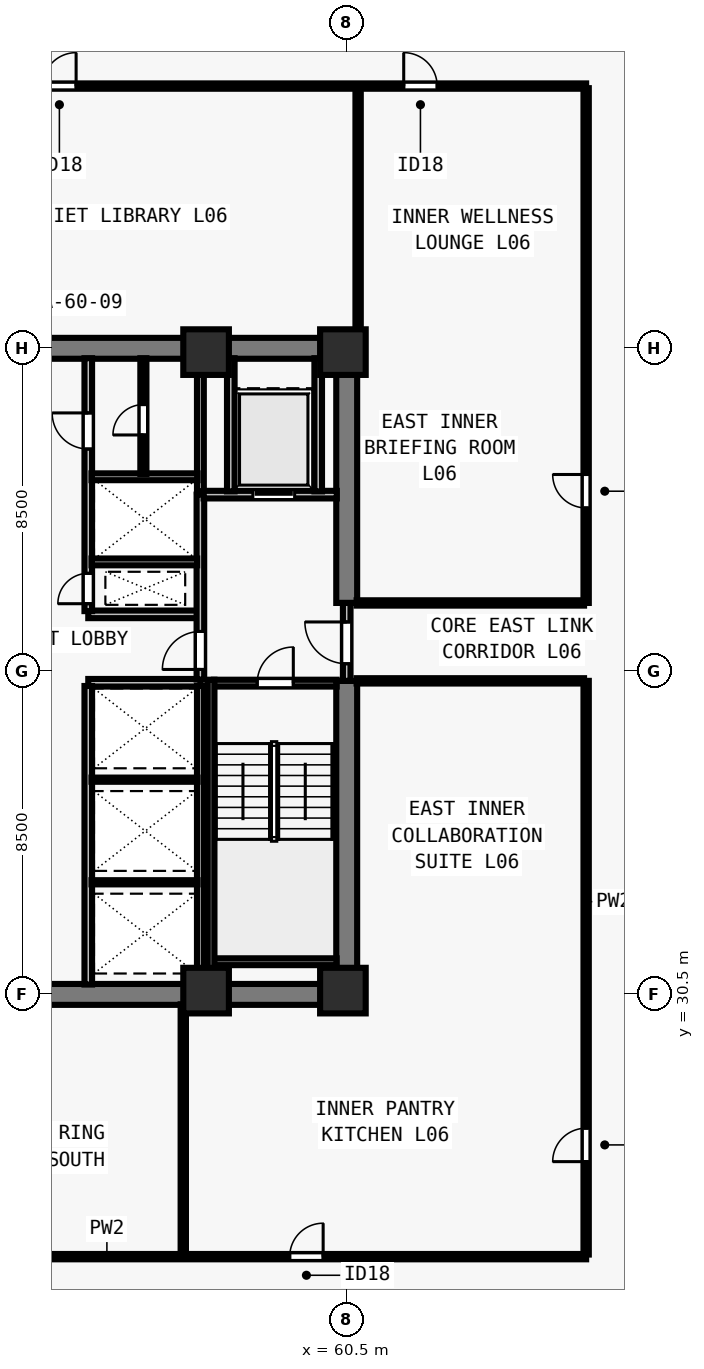
"""IFC4 building model, lengths in metres.
Left out: names, types, materials, properties, quantities, classifications, styles, units other than length and angle.
Written with IfcOpenShell. Run it as: python <this file> out.ifc"""

import sys

from ifc_helpers import new_model, si_unit, direction, frame, frame_2d, origin, origin_2d, place, context, subcontext, project, spatial, rectangle, extrude, element, fill, save


model = new_model("IFC4")
c1 = context("Model", 3, precision=1e-05, world=origin(), true_north=direction((0.0, 1.0)))
c2 = subcontext(c1, "Body", "Model", "MODEL_VIEW")
j1 = project(units=[si_unit("LENGTHUNIT", "METRE"), si_unit("PLANEANGLEUNIT", "RADIAN")], contexts=[c1])
p1 = place(None, origin())
s1 = spatial("IfcSite", under=j1, at=p1, CompositionType="ELEMENT")
p2 = place(p1, origin())
s2 = spatial("IfcBuilding", under=s1, at=p2, CompositionType="ELEMENT")
p3 = place(p2, frame((0.0, 0.0, 27.0)))
s3 = spatial("IfcBuildingStorey", under=s2, at=p3, CompositionType="ELEMENT", Elevation=27.0)
for number, where, z_axis, x_axis in (
    (1, (56.8, 30.6, 0.0), (0.0, 0.0, 1.0), (1.0, 0.0, 0.0)),
    (2, (60.4, 30.6, 0.0), (0.0, 0.0, 1.0), (1.0, 0.0, 0.0)),
    (3, (56.8, 47.4, 0.0), (0.0, 0.0, 1.0), (1.0, 0.0, 0.0)),
    (4, (60.4, 47.4, 0.0), (0.0, 0.0, 1.0), (1.0, 0.0, 0.0)),
):
    element("IfcColumn", number, at=place(p3, frame(where, z_axis=z_axis, x_axis=x_axis)), inside=s3, PredefinedType="COLUMN", context=c2, shape_type="SweptSolid", body=[
        extrude(rectangle(XDim=1.2, YDim=1.2, at=origin_2d()), origin(), (0.0, 0.0, 1.0), 3.5),
    ])
for number, where, z_axis, x_axis in (
    (5, (43.225, 30.5, 0.0), (0.0, 0.0, 1.0), (1.0, 0.0, 0.0)),
    (6, (43.225, 47.5, 0.0), (0.0, 0.0, 1.0), (1.0, 0.0, 0.0)),
):
    element("IfcWall", number, at=place(p3, frame(where, z_axis=z_axis, x_axis=x_axis)), inside=s3, PredefinedType="SHEAR", context=c2, shape_type="SweptSolid", body=[
        extrude(rectangle(XDim=17.55, YDim=0.55, at=frame_2d((8.775, 0.0))), origin(), (0.0, 0.0, 1.0), 3.28),
    ])
p4 = place(p3, frame((60.5, 30.765, 0.0), z_axis=(0.0, 0.0, 1.0), x_axis=(0.0, 1.0, 0.0)))
e7 = element("IfcWall", 7, at=p4, inside=s3, PredefinedType="SHEAR", context=c2, shape_type="SweptSolid", body=[
    extrude(rectangle(XDim=7.985, YDim=0.55, at=frame_2d((3.993, 0.0))), origin(), (0.0, 0.0, 1.0), 3.28),
])
p5 = place(p3, frame((60.5, 40.8, 0.0), z_axis=(0.0, 0.0, 1.0), x_axis=(0.0, 1.0, 0.0)))
e8 = element("IfcWall", 8, at=p5, inside=s3, PredefinedType="SHEAR", context=c2, shape_type="SweptSolid", body=[
    extrude(rectangle(XDim=6.435, YDim=0.55, at=frame_2d((3.218, 0.0))), origin(), (0.0, 0.0, 1.0), 3.28),
])
for number, where, z_axis, x_axis in (
    (9, (53.7, 38.7, 0.0), (0.0, 0.0, 1.0), (1.0, 0.0, 0.0)),
    (10, (53.7, 40.5, 0.0), (0.0, 0.0, 1.0), (1.0, 0.0, 0.0)),
):
    element("IfcWall", number, at=place(p3, frame(where, z_axis=z_axis, x_axis=x_axis)), inside=s3, PredefinedType="SOLIDWALL", context=c2, shape_type="SweptSolid", body=[
        extrude(rectangle(XDim=2.95, YDim=0.2, at=frame_2d((1.475, 0.0))), origin(), (0.0, 0.0, 1.0), 3.28),
    ])
p6 = place(p3, frame((53.7, 30.76, 0.0), z_axis=(0.0, 0.0, 1.0), x_axis=(0.0, 1.0, 0.0)))
e11 = element("IfcWall", 11, at=p6, inside=s3, PredefinedType="SOLIDWALL", context=c2, shape_type="SweptSolid", body=[
    extrude(rectangle(XDim=7.855, YDim=0.2, at=frame_2d((3.927, 0.0))), origin(), (0.0, 0.0, 1.0), 3.28),
])
p7 = place(p3, frame((53.7, 40.585, 0.0), z_axis=(0.0, 0.0, 1.0), x_axis=(0.0, 1.0, 0.0)))
e12 = element("IfcWall", 12, at=p7, inside=s3, PredefinedType="SOLIDWALL", context=c2, shape_type="SweptSolid", body=[
    extrude(rectangle(XDim=6.655, YDim=0.2, at=frame_2d((3.328, 0.0))), origin(), (0.0, 0.0, 1.0), 3.28),
])
p8 = place(p7, frame((0.195, 0.0, 0.0)))
e13 = element("IfcOpeningElement", 13, at=p8, cuts=e12, PredefinedType="OPENING", context=c2, shape_type="SweptSolid", body=[
    extrude(rectangle(XDim=0.8, YDim=2.08, at=frame_2d((0.4, 1.04))), frame((0.0, 0.11, 0.0), z_axis=(0.0, -1.0, 0.0), x_axis=(1.0, 0.0, 0.0)), (0.0, 0.0, 1.0), 0.22),
])
p9 = place(p7, frame((4.265, 0.0, 0.0)))
e14 = element("IfcOpeningElement", 14, at=p9, cuts=e12, PredefinedType="OPENING", context=c2, shape_type="SweptSolid", body=[
    extrude(rectangle(XDim=0.95, YDim=2.12, at=frame_2d((0.475, 1.06))), frame((0.0, 0.11, 0.0), z_axis=(0.0, -1.0, 0.0), x_axis=(1.0, 0.0, 0.0)), (0.0, 0.0, 1.0), 0.22),
])
p10 = place(p3, frame((60.5, 38.75, 0.0), z_axis=(0.0, 0.0, 1.0), x_axis=(0.0, 1.0, 0.0)))
e15 = element("IfcWall", 15, at=p10, inside=s3, PredefinedType="SOLIDWALL", context=c2, shape_type="SweptSolid", body=[
    extrude(rectangle(XDim=2.05, YDim=0.2, at=frame_2d((1.025, 0.0))), origin(), (0.0, 0.0, 1.0), 3.28),
])
p11 = place(p10, frame((0.45, 0.0, 0.0)))
e16 = element("IfcOpeningElement", 16, at=p11, cuts=e15, PredefinedType="OPENING", context=c2, shape_type="SweptSolid", body=[
    extrude(rectangle(XDim=1.1, YDim=2.15, at=frame_2d((0.55, 1.075))), frame((0.0, 0.11, 0.0), z_axis=(0.0, -1.0, 0.0), x_axis=(1.0, 0.0, 0.0)), (0.0, 0.0, 1.0), 0.22),
])
p12 = place(p3, frame((56.65, 38.785, 0.0), z_axis=(0.0, 0.0, 1.0), x_axis=(0.0, 1.0, 0.0)))
e17 = element("IfcWall", 17, at=p12, inside=s3, PredefinedType="SOLIDWALL", context=c2, shape_type="SweptSolid", body=[
    extrude(rectangle(XDim=4.865, YDim=0.2, at=frame_2d((2.433, 0.0))), origin(), (0.0, 0.0, 1.0), 3.28),
])
p13 = place(p12, frame((0.265, 0.0, 0.0)))
e18 = element("IfcOpeningElement", 18, at=p13, cuts=e17, PredefinedType="OPENING", context=c2, shape_type="SweptSolid", body=[
    extrude(rectangle(XDim=1.0, YDim=2.15, at=frame_2d((0.5, 1.075))), frame((0.0, 0.11, 0.0), z_axis=(0.0, -1.0, 0.0), x_axis=(1.0, 0.0, 0.0)), (0.0, 0.0, 1.0), 0.22),
])
p14 = place(p3, frame((56.735, 43.65, 0.0), z_axis=(0.0, 0.0, 1.0), x_axis=(1.0, 0.0, 0.0)))
e19 = element("IfcWall", 19, at=p14, inside=s3, PredefinedType="SOLIDWALL", context=c2, shape_type="SweptSolid", body=[
    extrude(rectangle(XDim=3.505, YDim=0.2, at=frame_2d((1.752, 0.0))), origin(), (0.0, 0.0, 1.0), 3.28),
])
p15 = place(p14, frame((1.295, 0.0, 0.0)))
e20 = element("IfcOpeningElement", 20, at=p15, cuts=e19, PredefinedType="OPENING", context=c2, shape_type="SweptSolid", body=[
    extrude(rectangle(XDim=1.1, YDim=2.2, at=frame_2d((0.55, 1.1))), frame((0.0, 0.11, 0.0), z_axis=(0.0, -1.0, 0.0), x_axis=(1.0, 0.0, 0.0)), (0.0, 0.0, 1.0), 0.22),
])
for number, where, z_axis, x_axis in (
    (21, (57.45, 43.735, 0.0), (0.0, 0.0, 1.0), (0.0, 1.0, 0.0)),
    (22, (59.75, 43.735, 0.0), (0.0, 0.0, 1.0), (0.0, 1.0, 0.0)),
):
    element("IfcWall", number, at=place(p3, frame(where, z_axis=z_axis, x_axis=x_axis)), inside=s3, PredefinedType="SOLIDWALL", context=c2, shape_type="SweptSolid", body=[
        extrude(rectangle(XDim=3.505, YDim=0.2, at=frame_2d((1.752, 0.0))), origin(), (0.0, 0.0, 1.0), 3.28),
    ])
p16 = place(p3, frame((56.65, 30.76, 0.0), z_axis=(0.0, 0.0, 1.0), x_axis=(0.0, 1.0, 0.0)))
e23 = element("IfcWall", 23, at=p16, inside=s3, PredefinedType="SOLIDWALL", context=c2, shape_type="SweptSolid", body=[
    extrude(rectangle(XDim=7.855, YDim=0.18, at=frame_2d((3.927, 0.0))), origin(), (0.0, 0.0, 1.0), 3.28),
])
for number, where, z_axis, x_axis in (
    (24, (53.785, 33.45, 0.0), (0.0, 0.0, 1.0), (1.0, 0.0, 0.0)),
    (25, (53.785, 36.15, 0.0), (0.0, 0.0, 1.0), (1.0, 0.0, 0.0)),
):
    element("IfcWall", number, at=place(p3, frame(where, z_axis=z_axis, x_axis=x_axis)), inside=s3, PredefinedType="PARTITIONING", context=c2, shape_type="SweptSolid", body=[
        extrude(rectangle(XDim=2.79, YDim=0.11, at=frame_2d((1.395, 0.0))), origin(), (0.0, 0.0, 1.0), 3.28),
    ])
p17 = place(p3, frame((56.65, 43.735, 0.0), z_axis=(0.0, 0.0, 1.0), x_axis=(0.0, 1.0, 0.0)))
e26 = element("IfcWall", 26, at=p17, inside=s3, PredefinedType="SOLIDWALL", context=c2, shape_type="SweptSolid", body=[
    extrude(rectangle(XDim=3.505, YDim=0.18, at=frame_2d((1.752, 0.0))), origin(), (0.0, 0.0, 1.0), 3.28),
])
p18 = place(p3, frame((53.785, 41.88, 0.0), z_axis=(0.0, 0.0, 1.0), x_axis=(1.0, 0.0, 0.0)))
e27 = element("IfcWall", 27, at=p18, inside=s3, PredefinedType="SOLIDWALL", context=c2, shape_type="SweptSolid", body=[
    extrude(rectangle(XDim=2.78, YDim=0.18, at=frame_2d((1.39, 0.0))), origin(), (0.0, 0.0, 1.0), 3.28),
])
p19 = place(p3, frame((53.785, 44.12, 0.0), z_axis=(0.0, 0.0, 1.0), x_axis=(1.0, 0.0, 0.0)))
e28 = element("IfcWall", 28, at=p19, inside=s3, PredefinedType="SOLIDWALL", context=c2, shape_type="SweptSolid", body=[
    extrude(rectangle(XDim=2.79, YDim=0.18, at=frame_2d((1.395, 0.0))), origin(), (0.0, 0.0, 1.0), 3.28),
])
p20 = place(p3, frame((55.15, 44.195, 0.0), z_axis=(0.0, 0.0, 1.0), x_axis=(0.0, 1.0, 0.0)))
e29 = element("IfcWall", 29, at=p20, inside=s3, PredefinedType="PARTITIONING", context=c2, shape_type="SweptSolid", body=[
    extrude(rectangle(XDim=3.045, YDim=0.16, at=frame_2d((1.522, 0.0))), origin(), (0.0, 0.0, 1.0), 3.28),
])
p21 = place(p20, frame((1.025, 0.0, 0.0)))
e30 = element("IfcOpeningElement", 30, at=p21, cuts=e29, PredefinedType="OPENING", context=c2, shape_type="SweptSolid", body=[
    extrude(rectangle(XDim=0.8, YDim=2.1, at=frame_2d((0.4, 1.05))), frame((0.0, 0.09, 0.0), z_axis=(0.0, -1.0, 0.0), x_axis=(1.0, 0.0, 0.0)), (0.0, 0.0, 1.0), 0.18),
])
p22 = place(p3, frame((37.2, 23.6, 0.0), z_axis=(0.0, 0.0, 1.0), x_axis=(1.0, 0.0, 0.0)))
e31 = element("IfcWall", 31, at=p22, inside=s3, PredefinedType="PARTITIONING", context=c2, shape_type="SweptSolid", body=[
    extrude(rectangle(XDim=29.6, YDim=0.14, at=frame_2d((14.8, 0.0))), origin(), (0.0, 0.0, 1.0), 3.28),
])
p23 = place(p22, frame((1.2, 0.0, 0.0)))
e32 = element("IfcOpeningElement", 32, at=p23, cuts=e31, PredefinedType="OPENING", context=c2, shape_type="SweptSolid", body=[
    extrude(rectangle(XDim=0.88, YDim=2.1, at=frame_2d((0.44, 1.05))), frame((0.0, 0.08, 0.0), z_axis=(0.0, -1.0, 0.0), x_axis=(1.0, 0.0, 0.0)), (0.0, 0.0, 1.0), 0.16),
])
p24 = place(p22, frame((11.3, 0.0, 0.0)))
e33 = element("IfcOpeningElement", 33, at=p24, cuts=e31, PredefinedType="OPENING", context=c2, shape_type="SweptSolid", body=[
    extrude(rectangle(XDim=0.88, YDim=2.1, at=frame_2d((0.44, 1.05))), frame((0.0, 0.08, 0.0), z_axis=(0.0, -1.0, 0.0), x_axis=(1.0, 0.0, 0.0)), (0.0, 0.0, 1.0), 0.16),
])
p25 = place(p22, frame((21.8, 0.0, 0.0)))
e34 = element("IfcOpeningElement", 34, at=p25, cuts=e31, PredefinedType="OPENING", context=c2, shape_type="SweptSolid", body=[
    extrude(rectangle(XDim=0.88, YDim=2.1, at=frame_2d((0.44, 1.05))), frame((0.0, 0.08, 0.0), z_axis=(0.0, -1.0, 0.0), x_axis=(1.0, 0.0, 0.0)), (0.0, 0.0, 1.0), 0.16),
])
p26 = place(p3, frame((37.2, 54.4, 0.0), z_axis=(0.0, 0.0, 1.0), x_axis=(1.0, 0.0, 0.0)))
e35 = element("IfcWall", 35, at=p26, inside=s3, PredefinedType="PARTITIONING", context=c2, shape_type="SweptSolid", body=[
    extrude(rectangle(XDim=29.6, YDim=0.14, at=frame_2d((14.8, 0.0))), origin(), (0.0, 0.0, 1.0), 3.28),
])
p27 = place(p26, frame((2.2, 0.0, 0.0)))
e36 = element("IfcOpeningElement", 36, at=p27, cuts=e35, PredefinedType="OPENING", context=c2, shape_type="SweptSolid", body=[
    extrude(rectangle(XDim=0.88, YDim=2.1, at=frame_2d((0.44, 1.05))), frame((0.0, 0.08, 0.0), z_axis=(0.0, -1.0, 0.0), x_axis=(1.0, 0.0, 0.0)), (0.0, 0.0, 1.0), 0.16),
])
p28 = place(p26, frame((15.3, 0.0, 0.0)))
e37 = element("IfcOpeningElement", 37, at=p28, cuts=e35, PredefinedType="OPENING", context=c2, shape_type="SweptSolid", body=[
    extrude(rectangle(XDim=0.88, YDim=2.1, at=frame_2d((0.44, 1.05))), frame((0.0, 0.08, 0.0), z_axis=(0.0, -1.0, 0.0), x_axis=(1.0, 0.0, 0.0)), (0.0, 0.0, 1.0), 0.16),
])
p29 = place(p26, frame((24.8, 0.0, 0.0)))
e38 = element("IfcOpeningElement", 38, at=p29, cuts=e35, PredefinedType="OPENING", context=c2, shape_type="SweptSolid", body=[
    extrude(rectangle(XDim=0.88, YDim=2.1, at=frame_2d((0.44, 1.05))), frame((0.0, 0.08, 0.0), z_axis=(0.0, -1.0, 0.0), x_axis=(1.0, 0.0, 0.0)), (0.0, 0.0, 1.0), 0.16),
])
p30 = place(p3, frame((66.8, 23.655, 0.0), z_axis=(0.0, 0.0, 1.0), x_axis=(0.0, 1.0, 0.0)))
e39 = element("IfcWall", 39, at=p30, inside=s3, PredefinedType="PARTITIONING", context=c2, shape_type="SweptSolid", body=[
    extrude(rectangle(XDim=15.095, YDim=0.14, at=frame_2d((7.547, 0.0))), origin(), (0.0, 0.0, 1.0), 3.28),
])
p31 = place(p30, frame((2.445, 0.0, 0.0)))
e40 = element("IfcOpeningElement", 40, at=p31, cuts=e39, PredefinedType="OPENING", context=c2, shape_type="SweptSolid", body=[
    extrude(rectangle(XDim=0.88, YDim=2.1, at=frame_2d((0.44, 1.05))), frame((0.0, 0.08, 0.0), z_axis=(0.0, -1.0, 0.0), x_axis=(1.0, 0.0, 0.0)), (0.0, 0.0, 1.0), 0.16),
])
p32 = place(p3, frame((66.8, 40.8, 0.0), z_axis=(0.0, 0.0, 1.0), x_axis=(0.0, 1.0, 0.0)))
e41 = element("IfcWall", 41, at=p32, inside=s3, PredefinedType="PARTITIONING", context=c2, shape_type="SweptSolid", body=[
    extrude(rectangle(XDim=13.545, YDim=0.14, at=frame_2d((6.772, 0.0))), origin(), (0.0, 0.0, 1.0), 3.28),
])
p33 = place(p32, frame((2.5, 0.0, 0.0)))
e42 = element("IfcOpeningElement", 42, at=p33, cuts=e41, PredefinedType="OPENING", context=c2, shape_type="SweptSolid", body=[
    extrude(rectangle(XDim=0.88, YDim=2.1, at=frame_2d((0.44, 1.05))), frame((0.0, 0.08, 0.0), z_axis=(0.0, -1.0, 0.0), x_axis=(1.0, 0.0, 0.0)), (0.0, 0.0, 1.0), 0.16),
])
for number, where, z_axis, x_axis in (
    (43, (60.76, 38.75, 0.0), (0.0, 0.0, 1.0), (1.0, 0.0, 0.0)),
    (44, (60.76, 40.8, 0.0), (0.0, 0.0, 1.0), (1.0, 0.0, 0.0)),
):
    element("IfcWall", number, at=place(p3, frame(where, z_axis=z_axis, x_axis=x_axis)), inside=s3, PredefinedType="PARTITIONING", context=c2, shape_type="SweptSolid", body=[
        extrude(rectangle(XDim=5.985, YDim=0.14, at=frame_2d((2.993, 0.0))), origin(), (0.0, 0.0, 1.0), 3.28),
    ])
p34 = place(p3, frame((56.2, 23.655, 0.0), z_axis=(0.0, 0.0, 1.0), x_axis=(0.0, 1.0, 0.0)))
e45 = element("IfcWall", 45, at=p34, inside=s3, PredefinedType="PARTITIONING", context=c2, shape_type="SweptSolid", body=[
    extrude(rectangle(XDim=6.585, YDim=0.14, at=frame_2d((3.292, 0.0))), origin(), (0.0, 0.0, 1.0), 2.849),
])
p35 = place(p3, frame((60.8, 47.76, 0.0), z_axis=(0.0, 0.0, 1.0), x_axis=(0.0, 1.0, 0.0)))
e46 = element("IfcWall", 46, at=p35, inside=s3, PredefinedType="PARTITIONING", context=c2, shape_type="SweptSolid", body=[
    extrude(rectangle(XDim=6.585, YDim=0.14, at=frame_2d((3.292, 0.0))), origin(), (0.0, 0.0, 1.0), 2.439),
])
p36 = place(p3, frame((57.005, 38.69, 0.0), z_axis=(0.0, 0.0, 1.0), x_axis=(1.0, 0.0, 0.0)))
e47 = element("IfcWall", 47, at=p36, inside=s3, PredefinedType="SOLIDWALL", context=c2, shape_type="SweptSolid", body=[
    extrude(rectangle(XDim=3.23, YDim=0.18, at=frame_2d((1.615, 0.0))), origin(), (0.0, 0.0, 1.0), 3.28),
])
p37 = place(p36, frame((1.14, 0.0, 0.0)))
e48 = element("IfcOpeningElement", 48, at=p37, cuts=e47, PredefinedType="OPENING", context=c2, shape_type="SweptSolid", body=[
    extrude(rectangle(XDim=0.95, YDim=2.15, at=frame_2d((0.475, 1.075))), frame((0.0, 0.1, 0.0), z_axis=(0.0, -1.0, 0.0), x_axis=(1.0, 0.0, 0.0)), (0.0, 0.0, 1.0), 0.2),
])
p38 = place(p3, frame((57.005, 31.36, 0.0), z_axis=(0.0, 0.0, 1.0), x_axis=(1.0, 0.0, 0.0)))
e49 = element("IfcWall", 49, at=p38, inside=s3, PredefinedType="SOLIDWALL", context=c2, shape_type="SweptSolid", body=[
    extrude(rectangle(XDim=3.23, YDim=0.18, at=frame_2d((1.615, 0.0))), origin(), (0.0, 0.0, 1.0), 3.28),
])
p39 = place(p3, frame((56.93, 38.78, 0.0), z_axis=(0.0, 0.0, 1.0), x_axis=(0.0, -1.0, 0.0)))
e50 = element("IfcWall", 50, at=p39, inside=s3, PredefinedType="SOLIDWALL", context=c2, shape_type="SweptSolid", body=[
    extrude(rectangle(XDim=8.017, YDim=0.18, at=frame_2d((4.009, 0.0))), origin(), (0.0, 0.0, 1.0), 3.28),
])
p40 = place(p11, origin())
e51 = element("IfcDoor", 51, at=p40, inside=s3, OperationType="SINGLE_SWING_RIGHT", PredefinedType="DOOR", context=c2, shape_type="SweptSolid", body=[
    extrude(rectangle(XDim=1.1, YDim=2.15, at=frame_2d((0.55, 1.075))), frame((0.0, 0.025, 0.0), z_axis=(0.0, -1.0, 0.0), x_axis=(1.0, 0.0, 0.0)), (0.0, 0.0, 1.0), 0.05),
])
fill(e16, e51)
p41 = place(p13, origin())
e52 = element("IfcDoor", 52, at=p41, inside=s3, OperationType="SINGLE_SWING_LEFT", PredefinedType="DOOR", context=c2, shape_type="SweptSolid", body=[
    extrude(rectangle(XDim=1.0, YDim=2.15, at=frame_2d((0.5, 1.075))), frame((0.0, 0.025, 0.0), z_axis=(0.0, -1.0, 0.0), x_axis=(1.0, 0.0, 0.0)), (0.0, 0.0, 1.0), 0.05),
])
fill(e18, e52)
p42 = place(p15, origin())
e53 = element("IfcDoor", 53, at=p42, inside=s3, OperationType="SLIDING_TO_LEFT", PredefinedType="DOOR", context=c2, shape_type="SweptSolid", body=[
    extrude(rectangle(XDim=1.1, YDim=2.2, at=frame_2d((0.55, 1.1))), frame((0.0, 0.025, 0.0), z_axis=(0.0, -1.0, 0.0), x_axis=(1.0, 0.0, 0.0)), (0.0, 0.0, 1.0), 0.05),
])
fill(e20, e53)
p43 = place(p8, origin())
e54 = element("IfcDoor", 54, at=p43, inside=s3, OperationType="SINGLE_SWING_LEFT", PredefinedType="DOOR", context=c2, shape_type="SweptSolid", body=[
    extrude(rectangle(XDim=0.8, YDim=2.08, at=frame_2d((0.4, 1.04))), frame((0.0, 0.025, 0.0), z_axis=(0.0, -1.0, 0.0), x_axis=(1.0, 0.0, 0.0)), (0.0, 0.0, 1.0), 0.05),
])
fill(e13, e54)
p44 = place(p9, origin())
e55 = element("IfcDoor", 55, at=p44, inside=s3, OperationType="SINGLE_SWING_RIGHT", PredefinedType="DOOR", context=c2, shape_type="SweptSolid", body=[
    extrude(rectangle(XDim=0.95, YDim=2.12, at=frame_2d((0.475, 1.06))), frame((0.0, 0.025, 0.0), z_axis=(0.0, -1.0, 0.0), x_axis=(1.0, 0.0, 0.0)), (0.0, 0.0, 1.0), 0.05),
])
fill(e14, e55)
p45 = place(p21, origin())
e56 = element("IfcDoor", 56, at=p45, inside=s3, OperationType="SINGLE_SWING_LEFT", PredefinedType="DOOR", context=c2, shape_type="SweptSolid", body=[
    extrude(rectangle(XDim=0.8, YDim=2.1, at=frame_2d((0.4, 1.05))), frame((0.0, 0.025, 0.0), z_axis=(0.0, -1.0, 0.0), x_axis=(1.0, 0.0, 0.0)), (0.0, 0.0, 1.0), 0.05),
])
fill(e30, e56)
p46 = place(p25, origin())
e57 = element("IfcDoor", 57, at=p46, inside=s3, OperationType="SINGLE_SWING_RIGHT", PredefinedType="DOOR", context=c2, shape_type="SweptSolid", body=[
    extrude(rectangle(XDim=0.88, YDim=2.1, at=frame_2d((0.44, 1.05))), frame((0.0, 0.025, 0.0), z_axis=(0.0, -1.0, 0.0), x_axis=(1.0, 0.0, 0.0)), (0.0, 0.0, 1.0), 0.05),
])
fill(e34, e57)
p47 = place(p28, origin())
e58 = element("IfcDoor", 58, at=p47, inside=s3, OperationType="SINGLE_SWING_RIGHT", PredefinedType="DOOR", context=c2, shape_type="SweptSolid", body=[
    extrude(rectangle(XDim=0.88, YDim=2.1, at=frame_2d((0.44, 1.05))), frame((0.0, 0.025, 0.0), z_axis=(0.0, -1.0, 0.0), x_axis=(1.0, 0.0, 0.0)), (0.0, 0.0, 1.0), 0.05),
])
fill(e37, e58)
p48 = place(p29, origin())
e59 = element("IfcDoor", 59, at=p48, inside=s3, OperationType="SINGLE_SWING_LEFT", PredefinedType="DOOR", context=c2, shape_type="SweptSolid", body=[
    extrude(rectangle(XDim=0.88, YDim=2.1, at=frame_2d((0.44, 1.05))), frame((0.0, 0.025, 0.0), z_axis=(0.0, -1.0, 0.0), x_axis=(1.0, 0.0, 0.0)), (0.0, 0.0, 1.0), 0.05),
])
fill(e38, e59)
p49 = place(p31, origin())
e60 = element("IfcDoor", 60, at=p49, inside=s3, OperationType="SINGLE_SWING_LEFT", PredefinedType="DOOR", context=c2, shape_type="SweptSolid", body=[
    extrude(rectangle(XDim=0.88, YDim=2.1, at=frame_2d((0.44, 1.05))), frame((0.0, 0.025, 0.0), z_axis=(0.0, -1.0, 0.0), x_axis=(1.0, 0.0, 0.0)), (0.0, 0.0, 1.0), 0.05),
])
fill(e40, e60)
p50 = place(p33, origin())
e61 = element("IfcDoor", 61, at=p50, inside=s3, OperationType="SINGLE_SWING_RIGHT", PredefinedType="DOOR", context=c2, shape_type="SweptSolid", body=[
    extrude(rectangle(XDim=0.88, YDim=2.1, at=frame_2d((0.44, 1.05))), frame((0.0, 0.025, 0.0), z_axis=(0.0, -1.0, 0.0), x_axis=(1.0, 0.0, 0.0)), (0.0, 0.0, 1.0), 0.05),
])
fill(e42, e61)
p51 = place(p37, origin())
e62 = element("IfcDoor", 62, at=p51, inside=s3, OperationType="SINGLE_SWING_RIGHT", PredefinedType="DOOR", context=c2, shape_type="SweptSolid", body=[
    extrude(rectangle(XDim=0.95, YDim=2.15, at=frame_2d((0.475, 1.075))), frame((0.0, 0.025, 0.0), z_axis=(0.0, -1.0, 0.0), x_axis=(1.0, 0.0, 0.0)), (0.0, 0.0, 1.0), 0.05),
])
fill(e48, e62)
save(model, sys.argv[1])
